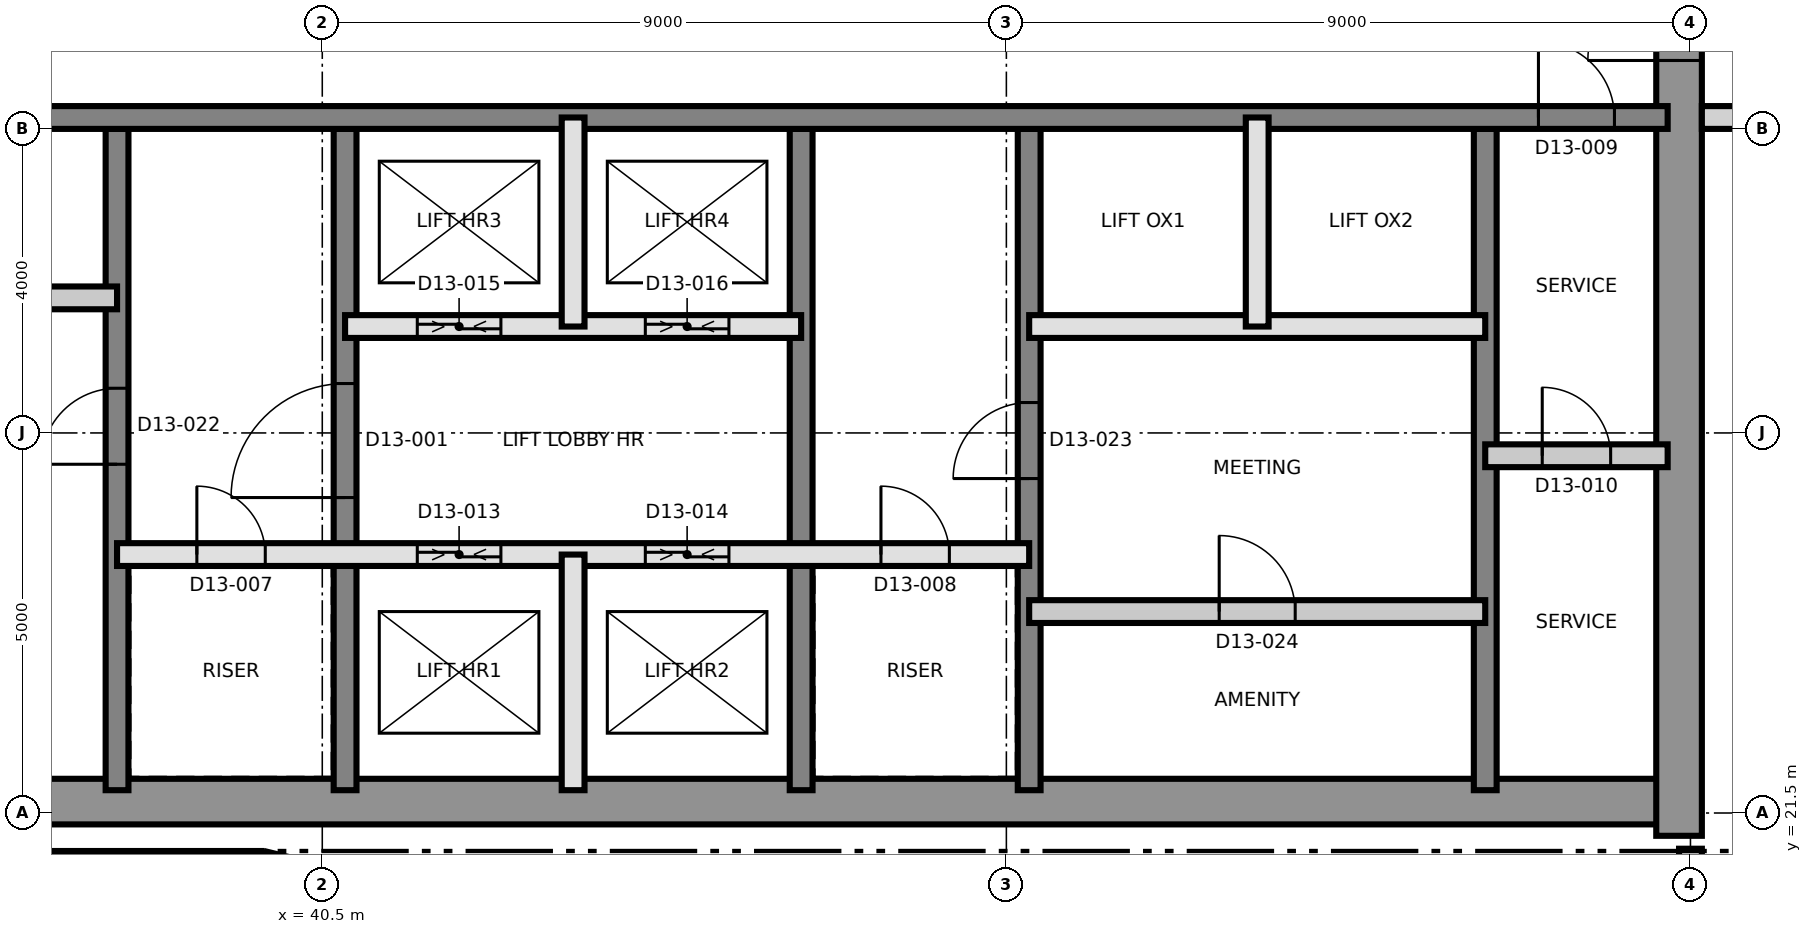
"""IFC4 building model, lengths in metres.
Left out: names, types, materials, properties, quantities, classifications, styles, units other than length and angle.
Written with IfcOpenShell. Run it as: python <this file> out.ifc"""

import sys

from ifc_helpers import new_model, si_unit, direction, frame, frame_2d, origin, place, context, subcontext, project, spatial, rectangle, extrude, element, fill, save


model = new_model("IFC4")
c1 = context("Model", 3, precision=1e-05, world=origin(), true_north=direction((0.0, 1.0)))
c2 = subcontext(c1, "Body", "Model", "MODEL_VIEW")
j1 = project(units=[si_unit("LENGTHUNIT", "METRE"), si_unit("PLANEANGLEUNIT", "RADIAN")], contexts=[c1])
p1 = place(None, origin())
s1 = spatial("IfcSite", under=j1, at=p1, CompositionType="ELEMENT")
p2 = place(p1, origin())
s2 = spatial("IfcBuilding", under=s1, at=p2, CompositionType="ELEMENT")
p3 = place(p2, frame((0.0, 0.0, 142.2)))
s3 = spatial("IfcBuildingStorey", under=s2, at=p3, CompositionType="ELEMENT", Elevation=142.2)
p4 = place(p3, frame((31.2, 21.65, 0.0), z_axis=(0.0, 0.0, 1.0), x_axis=(1.0, 0.0, 0.0)))
e1 = element("IfcWall", 1, at=p4, inside=s3, PredefinedType="SHEAR", context=c2, shape_type="SweptSolid", body=[
    extrude(rectangle(XDim=27.0, YDim=0.6, at=frame_2d((13.5, 0.0))), origin(), (0.0, 0.0, 1.0), 3.7),
])
p5 = place(p3, frame((58.35, 21.2, 0.0), z_axis=(0.0, 0.0, 1.0), x_axis=(0.0, 1.0, 0.0)))
e2 = element("IfcWall", 2, at=p5, inside=s3, PredefinedType="SHEAR", context=c2, shape_type="SweptSolid", body=[
    extrude(rectangle(XDim=18.6, YDim=0.6, at=frame_2d((9.3, 0.0))), origin(), (0.0, 0.0, 1.0), 3.7),
])
p6 = place(p5, frame((10.2, 0.0, 0.0)))
e3 = element("IfcOpeningElement", 3, at=p6, cuts=e2, PredefinedType="OPENING", context=c2, shape_type="SweptSolid", body=[
    extrude(rectangle(XDim=1.2, YDim=2.1, at=frame_2d((0.6, 1.05))), frame((0.0, 0.31, 0.0), z_axis=(0.0, -1.0, 0.0), x_axis=(1.0, 0.0, 0.0)), (0.0, 0.0, 1.0), 0.62),
])
p7 = place(p3, frame((37.8, 21.8, 0.0), z_axis=(0.0, 0.0, 1.0), x_axis=(0.0, 1.0, 0.0)))
e4 = element("IfcWall", 4, at=p7, inside=s3, PredefinedType="SHEAR", context=c2, shape_type="SweptSolid", body=[
    extrude(rectangle(XDim=8.7, YDim=0.3, at=frame_2d((4.35, 0.0))), origin(), (0.0, 0.0, 1.0), 3.7),
])
p8 = place(p7, frame((4.288, 0.0, 0.0)))
e5 = element("IfcOpeningElement", 5, at=p8, cuts=e4, PredefinedType="OPENING", context=c2, shape_type="SweptSolid", body=[
    extrude(rectangle(XDim=1.0, YDim=2.1, at=frame_2d((0.5, 1.05))), frame((0.0, 0.16, 0.0), z_axis=(0.0, -1.0, 0.0), x_axis=(1.0, 0.0, 0.0)), (0.0, 0.0, 1.0), 0.32),
])
p9 = place(p3, frame((40.8, 21.8, 0.0), z_axis=(0.0, 0.0, 1.0), x_axis=(0.0, 1.0, 0.0)))
e6 = element("IfcWall", 6, at=p9, inside=s3, PredefinedType="SHEAR", context=c2, shape_type="SweptSolid", body=[
    extrude(rectangle(XDim=8.7, YDim=0.3, at=frame_2d((4.35, 0.0))), origin(), (0.0, 0.0, 1.0), 3.7),
])
p10 = place(p9, frame((3.85, 0.0, 0.0)))
e7 = element("IfcOpeningElement", 7, at=p10, cuts=e6, PredefinedType="OPENING", context=c2, shape_type="SweptSolid", body=[
    extrude(rectangle(XDim=1.5, YDim=2.1, at=frame_2d((0.75, 1.05))), frame((0.0, 0.16, 0.0), z_axis=(0.0, -1.0, 0.0), x_axis=(1.0, 0.0, 0.0)), (0.0, 0.0, 1.0), 0.32),
])
p11 = place(p3, frame((46.8, 21.8, 0.0), z_axis=(0.0, 0.0, 1.0), x_axis=(0.0, 1.0, 0.0)))
e8 = element("IfcWall", 8, at=p11, inside=s3, PredefinedType="SHEAR", context=c2, shape_type="SweptSolid", body=[
    extrude(rectangle(XDim=8.7, YDim=0.3, at=frame_2d((4.35, 0.0))), origin(), (0.0, 0.0, 1.0), 3.7),
])
p12 = place(p3, frame((49.8, 21.8, 0.0), z_axis=(0.0, 0.0, 1.0), x_axis=(0.0, 1.0, 0.0)))
e9 = element("IfcWall", 9, at=p12, inside=s3, PredefinedType="SHEAR", context=c2, shape_type="SweptSolid", body=[
    extrude(rectangle(XDim=8.7, YDim=0.3, at=frame_2d((4.35, 0.0))), origin(), (0.0, 0.0, 1.0), 3.7),
])
p13 = place(p12, frame((4.1, 0.0, 0.0)))
e10 = element("IfcOpeningElement", 10, at=p13, cuts=e9, PredefinedType="OPENING", context=c2, shape_type="SweptSolid", body=[
    extrude(rectangle(XDim=1.0, YDim=2.1, at=frame_2d((0.5, 1.05))), frame((0.0, 0.16, 0.0), z_axis=(0.0, -1.0, 0.0), x_axis=(1.0, 0.0, 0.0)), (0.0, 0.0, 1.0), 0.32),
])
p14 = place(p3, frame((55.8, 21.8, 0.0), z_axis=(0.0, 0.0, 1.0), x_axis=(0.0, 1.0, 0.0)))
e11 = element("IfcWall", 11, at=p14, inside=s3, PredefinedType="SHEAR", context=c2, shape_type="SweptSolid", body=[
    extrude(rectangle(XDim=8.7, YDim=0.3, at=frame_2d((4.35, 0.0))), origin(), (0.0, 0.0, 1.0), 3.7),
])
p15 = place(p3, frame((31.8, 30.65, 0.0), z_axis=(0.0, 0.0, 1.0), x_axis=(1.0, 0.0, 0.0)))
e12 = element("IfcWall", 12, at=p15, inside=s3, PredefinedType="SHEAR", context=c2, shape_type="SweptSolid", body=[
    extrude(rectangle(XDim=26.4, YDim=0.3, at=frame_2d((13.2, 0.0))), origin(), (0.0, 0.0, 1.0), 3.7),
])
p16 = place(p15, frame((24.7, 0.0, 0.0)))
e13 = element("IfcOpeningElement", 13, at=p16, cuts=e12, PredefinedType="OPENING", context=c2, shape_type="SweptSolid", body=[
    extrude(rectangle(XDim=1.0, YDim=2.1, at=frame_2d((0.5, 1.05))), frame((0.0, 0.16, 0.0), z_axis=(0.0, -1.0, 0.0), x_axis=(1.0, 0.0, 0.0)), (0.0, 0.0, 1.0), 0.32),
])
p17 = place(p15, frame((4.0, 0.0, 0.0)))
e14 = element("IfcOpeningElement", 14, at=p17, cuts=e12, PredefinedType="OPENING", context=c2, shape_type="SweptSolid", body=[
    extrude(rectangle(XDim=1.0, YDim=2.1, at=frame_2d((0.5, 1.05))), frame((0.0, 0.16, 0.0), z_axis=(0.0, -1.0, 0.0), x_axis=(1.0, 0.0, 0.0)), (0.0, 0.0, 1.0), 0.32),
])
p18 = place(p3, frame((31.36, 20.85, 0.0), z_axis=(0.0, 0.0, 1.0), x_axis=(1.0, 0.0, 0.0)))
e15 = element("IfcWall", 15, at=p18, inside=s3, PredefinedType="SOLIDWALL", context=c2, shape_type="SweptSolid", body=[
    extrude(rectangle(XDim=8.34, YDim=0.3, at=frame_2d((4.17, 0.0))), origin(), (0.0, 0.0, 1.0), 3.4),
])
p19 = place(p3, frame((39.735, 20.846, 0.0), z_axis=(0.0, 0.0, 1.0), x_axis=(0.97206095595, -0.234728562212, 0.0)))
e16 = element("IfcWall", 16, at=p19, inside=s3, PredefinedType="SOLIDWALL", context=c2, shape_type="SweptSolid", body=[
    extrude(rectangle(XDim=2.35, YDim=0.3, at=frame_2d((1.175, 0.0))), origin(), (0.0, 0.0, 1.0), 3.4),
])
p20 = place(p3, frame((49.8, 24.15, 0.0), z_axis=(0.0, 0.0, 1.0), x_axis=(1.0, 0.0, 0.0)))
e17 = element("IfcWall", 17, at=p20, inside=s3, PredefinedType="PARTITIONING", context=c2, shape_type="SweptSolid", body=[
    extrude(rectangle(XDim=6.0, YDim=0.3, at=frame_2d((3.0, 0.0))), origin(), (0.0, 0.0, 1.0), 3.4),
])
p21 = place(p20, frame((2.5, 0.0, 0.0)))
e18 = element("IfcOpeningElement", 18, at=p21, cuts=e17, PredefinedType="OPENING", context=c2, shape_type="SweptSolid", body=[
    extrude(rectangle(XDim=1.0, YDim=2.1, at=frame_2d((0.5, 1.05))), frame((0.0, 0.16, 0.0), z_axis=(0.0, -1.0, 0.0), x_axis=(1.0, 0.0, 0.0)), (0.0, 0.0, 1.0), 0.32),
])
p22 = place(p3, frame((37.8, 24.9, 0.0), z_axis=(0.0, 0.0, 1.0), x_axis=(1.0, 0.0, 0.0)))
e19 = element("IfcWall", 19, at=p22, inside=s3, PredefinedType="SOLIDWALL", context=c2, shape_type="SweptSolid", body=[
    extrude(rectangle(XDim=12.0, YDim=0.3, at=frame_2d((6.0, 0.0))), origin(), (0.0, 0.0, 1.0), 3.4),
])
p23 = place(p22, frame((1.05, 0.0, 0.0)))
e20 = element("IfcOpeningElement", 20, at=p23, cuts=e19, PredefinedType="OPENING", context=c2, shape_type="SweptSolid", body=[
    extrude(rectangle(XDim=0.9, YDim=2.1, at=frame_2d((0.45, 1.05))), frame((0.0, 0.16, 0.0), z_axis=(0.0, -1.0, 0.0), x_axis=(1.0, 0.0, 0.0)), (0.0, 0.0, 1.0), 0.32),
])
p24 = place(p22, frame((10.05, 0.0, 0.0)))
e21 = element("IfcOpeningElement", 21, at=p24, cuts=e19, PredefinedType="OPENING", context=c2, shape_type="SweptSolid", body=[
    extrude(rectangle(XDim=0.9, YDim=2.1, at=frame_2d((0.45, 1.05))), frame((0.0, 0.16, 0.0), z_axis=(0.0, -1.0, 0.0), x_axis=(1.0, 0.0, 0.0)), (0.0, 0.0, 1.0), 0.32),
])
p25 = place(p22, frame((3.95, 0.0, 0.0)))
e22 = element("IfcOpeningElement", 22, at=p25, cuts=e19, PredefinedType="OPENING", context=c2, shape_type="SweptSolid", body=[
    extrude(rectangle(XDim=1.1, YDim=2.4, at=frame_2d((0.55, 1.2))), frame((0.0, 0.16, 0.0), z_axis=(0.0, -1.0, 0.0), x_axis=(1.0, 0.0, 0.0)), (0.0, 0.0, 1.0), 0.32),
])
p26 = place(p22, frame((6.95, 0.0, 0.0)))
e23 = element("IfcOpeningElement", 23, at=p26, cuts=e19, PredefinedType="OPENING", context=c2, shape_type="SweptSolid", body=[
    extrude(rectangle(XDim=1.1, YDim=2.4, at=frame_2d((0.55, 1.2))), frame((0.0, 0.16, 0.0), z_axis=(0.0, -1.0, 0.0), x_axis=(1.0, 0.0, 0.0)), (0.0, 0.0, 1.0), 0.32),
])
p27 = place(p3, frame((55.8, 26.2, 0.0), z_axis=(0.0, 0.0, 1.0), x_axis=(1.0, 0.0, 0.0)))
e24 = element("IfcWall", 24, at=p27, inside=s3, PredefinedType="PARTITIONING", context=c2, shape_type="SweptSolid", body=[
    extrude(rectangle(XDim=2.4, YDim=0.3, at=frame_2d((1.2, 0.0))), origin(), (0.0, 0.0, 1.0), 3.4),
])
p28 = place(p27, frame((0.75, 0.0, 0.0)))
e25 = element("IfcOpeningElement", 25, at=p28, cuts=e24, PredefinedType="OPENING", context=c2, shape_type="SweptSolid", body=[
    extrude(rectangle(XDim=0.9, YDim=2.1, at=frame_2d((0.45, 1.05))), frame((0.0, 0.16, 0.0), z_axis=(0.0, -1.0, 0.0), x_axis=(1.0, 0.0, 0.0)), (0.0, 0.0, 1.0), 0.32),
])
p29 = place(p3, frame((40.8, 27.9, 0.0), z_axis=(0.0, 0.0, 1.0), x_axis=(1.0, 0.0, 0.0)))
e26 = element("IfcWall", 26, at=p29, inside=s3, PredefinedType="SOLIDWALL", context=c2, shape_type="SweptSolid", body=[
    extrude(rectangle(XDim=6.0, YDim=0.3, at=frame_2d((3.0, 0.0))), origin(), (0.0, 0.0, 1.0), 3.4),
])
p30 = place(p29, frame((0.95, 0.0, 0.0)))
e27 = element("IfcOpeningElement", 27, at=p30, cuts=e26, PredefinedType="OPENING", context=c2, shape_type="SweptSolid", body=[
    extrude(rectangle(XDim=1.1, YDim=2.4, at=frame_2d((0.55, 1.2))), frame((0.0, 0.16, 0.0), z_axis=(0.0, -1.0, 0.0), x_axis=(1.0, 0.0, 0.0)), (0.0, 0.0, 1.0), 0.32),
])
p31 = place(p29, frame((3.95, 0.0, 0.0)))
e28 = element("IfcOpeningElement", 28, at=p31, cuts=e26, PredefinedType="OPENING", context=c2, shape_type="SweptSolid", body=[
    extrude(rectangle(XDim=1.1, YDim=2.4, at=frame_2d((0.55, 1.2))), frame((0.0, 0.16, 0.0), z_axis=(0.0, -1.0, 0.0), x_axis=(1.0, 0.0, 0.0)), (0.0, 0.0, 1.0), 0.32),
])
p32 = place(p3, frame((49.8, 27.9, 0.0), z_axis=(0.0, 0.0, 1.0), x_axis=(1.0, 0.0, 0.0)))
e29 = element("IfcWall", 29, at=p32, inside=s3, PredefinedType="SOLIDWALL", context=c2, shape_type="SweptSolid", body=[
    extrude(rectangle(XDim=6.0, YDim=0.3, at=frame_2d((3.0, 0.0))), origin(), (0.0, 0.0, 1.0), 3.4),
])
p33 = place(p3, frame((31.8, 28.277, 0.0), z_axis=(0.0, 0.0, 1.0), x_axis=(1.0, 0.0, 0.0)))
e30 = element("IfcWall", 30, at=p33, inside=s3, PredefinedType="PARTITIONING", context=c2, shape_type="SweptSolid", body=[
    extrude(rectangle(XDim=6.0, YDim=0.3, at=frame_2d((3.0, 0.0))), origin(), (0.0, 0.0, 1.0), 3.4),
])
p34 = place(p3, frame((43.8, 21.8, 0.0), z_axis=(0.0, 0.0, 1.0), x_axis=(0.0, 1.0, 0.0)))
e31 = element("IfcWall", 31, at=p34, inside=s3, PredefinedType="SOLIDWALL", context=c2, shape_type="SweptSolid", body=[
    extrude(rectangle(XDim=3.1, YDim=0.3, at=frame_2d((1.55, 0.0))), origin(), (0.0, 0.0, 1.0), 3.4),
])
for number, where, z_axis, x_axis in (
    (32, (43.8, 27.9, 0.0), (0.0, 0.0, 1.0), (0.0, 1.0, 0.0)),
    (33, (52.8, 27.9, 0.0), (0.0, 0.0, 1.0), (0.0, 1.0, 0.0)),
):
    element("IfcWall", number, at=place(p3, frame(where, z_axis=z_axis, x_axis=x_axis)), inside=s3, PredefinedType="SOLIDWALL", context=c2, shape_type="SweptSolid", body=[
        extrude(rectangle(XDim=2.75, YDim=0.3, at=frame_2d((1.375, 0.0))), origin(), (0.0, 0.0, 1.0), 3.4),
    ])
p35 = place(p3, frame((58.65, 30.65, 0.0), z_axis=(0.0, 0.0, 1.0), x_axis=(1.0, 0.0, 0.0)))
e34 = element("IfcWall", 34, at=p35, inside=s3, PredefinedType="PARTITIONING", context=c2, shape_type="SweptSolid", body=[
    extrude(rectangle(XDim=26.68, YDim=0.3, at=frame_2d((13.34, 0.0))), origin(), (0.0, 0.0, 1.0), 3.4),
])
p36 = place(p35, frame((2.2, 0.0, 0.0)))
e35 = element("IfcOpeningElement", 35, at=p36, cuts=e34, PredefinedType="OPENING", context=c2, shape_type="SweptSolid", body=[
    extrude(rectangle(XDim=1.0, YDim=2.4, at=frame_2d((0.5, 1.2))), frame((0.0, 0.16, 0.0), z_axis=(0.0, -1.0, 0.0), x_axis=(1.0, 0.0, 0.0)), (0.0, 0.0, 1.0), 0.32),
])
p37 = place(p35, frame((12.85, 0.0, 0.0)))
e36 = element("IfcOpeningElement", 36, at=p37, cuts=e34, PredefinedType="OPENING", context=c2, shape_type="SweptSolid", body=[
    extrude(rectangle(XDim=1.0, YDim=2.4, at=frame_2d((0.5, 1.2))), frame((0.0, 0.16, 0.0), z_axis=(0.0, -1.0, 0.0), x_axis=(1.0, 0.0, 0.0)), (0.0, 0.0, 1.0), 0.32),
])
p38 = place(p35, frame((20.77, 0.0, 0.0)))
e37 = element("IfcOpeningElement", 37, at=p38, cuts=e34, PredefinedType="OPENING", context=c2, shape_type="SweptSolid", body=[
    extrude(rectangle(XDim=1.0, YDim=2.1, at=frame_2d((0.5, 1.05))), frame((0.0, 0.16, 0.0), z_axis=(0.0, -1.0, 0.0), x_axis=(1.0, 0.0, 0.0)), (0.0, 0.0, 1.0), 0.32),
])
p39 = place(p35, frame((22.57, 0.0, 0.0)))
e38 = element("IfcOpeningElement", 38, at=p39, cuts=e34, PredefinedType="OPENING", context=c2, shape_type="SweptSolid", body=[
    extrude(rectangle(XDim=1.0, YDim=2.1, at=frame_2d((0.5, 1.05))), frame((0.0, 0.16, 0.0), z_axis=(0.0, -1.0, 0.0), x_axis=(1.0, 0.0, 0.0)), (0.0, 0.0, 1.0), 0.32),
])
p40 = place(p3, frame((58.5, 20.35, 0.0), z_axis=(0.0, 0.0, 1.0), x_axis=(0.0, 1.0, 0.0)))
e39 = element("IfcWall", 39, at=p40, inside=s3, PredefinedType="PARTITIONING", context=c2, shape_type="SweptSolid", body=[
    extrude(rectangle(XDim=0.68, YDim=0.3, at=frame_2d((0.34, 0.0))), origin(), (0.0, 0.0, 1.0), 3.4),
])
p41 = place(p10, origin())
e40 = element("IfcDoor", 40, at=p41, inside=s3, OperationType="SINGLE_SWING_RIGHT", PredefinedType="DOOR", context=c2, shape_type="SweptSolid", body=[
    extrude(rectangle(XDim=1.5, YDim=2.1, at=frame_2d((0.75, 1.05))), frame((0.0, 0.025, 0.0), z_axis=(0.0, -1.0, 0.0), x_axis=(1.0, 0.0, 0.0)), (0.0, 0.0, 1.0), 0.05),
])
fill(e7, e40)
p42 = place(p23, origin())
e41 = element("IfcDoor", 41, at=p42, inside=s3, OperationType="SINGLE_SWING_LEFT", PredefinedType="DOOR", context=c2, shape_type="SweptSolid", body=[
    extrude(rectangle(XDim=0.9, YDim=2.1, at=frame_2d((0.45, 1.05))), frame((0.0, 0.025, 0.0), z_axis=(0.0, -1.0, 0.0), x_axis=(1.0, 0.0, 0.0)), (0.0, 0.0, 1.0), 0.05),
])
fill(e20, e41)
p43 = place(p24, origin())
e42 = element("IfcDoor", 42, at=p43, inside=s3, OperationType="SINGLE_SWING_RIGHT", PredefinedType="DOOR", context=c2, shape_type="SweptSolid", body=[
    extrude(rectangle(XDim=0.9, YDim=2.1, at=frame_2d((0.45, 1.05))), frame((0.0, 0.025, 0.0), z_axis=(0.0, -1.0, 0.0), x_axis=(1.0, 0.0, 0.0)), (0.0, 0.0, 1.0), 0.05),
])
fill(e21, e42)
p44 = place(p16, origin())
e43 = element("IfcDoor", 43, at=p44, inside=s3, OperationType="SINGLE_SWING_LEFT", PredefinedType="DOOR", context=c2, shape_type="SweptSolid", body=[
    extrude(rectangle(XDim=1.0, YDim=2.1, at=frame_2d((0.5, 1.05))), frame((0.0, 0.025, 0.0), z_axis=(0.0, -1.0, 0.0), x_axis=(1.0, 0.0, 0.0)), (0.0, 0.0, 1.0), 0.05),
])
fill(e13, e43)
p45 = place(p28, origin())
e44 = element("IfcDoor", 44, at=p45, inside=s3, OperationType="SINGLE_SWING_RIGHT", PredefinedType="DOOR", context=c2, shape_type="SweptSolid", body=[
    extrude(rectangle(XDim=0.9, YDim=2.1, at=frame_2d((0.45, 1.05))), frame((0.0, 0.025, 0.0), z_axis=(0.0, -1.0, 0.0), x_axis=(1.0, 0.0, 0.0)), (0.0, 0.0, 1.0), 0.05),
])
fill(e25, e44)
p46 = place(p6, origin())
e45 = element("IfcDoor", 45, at=p46, inside=s3, OperationType="SINGLE_SWING_LEFT", PredefinedType="DOOR", context=c2, shape_type="SweptSolid", body=[
    extrude(rectangle(XDim=1.2, YDim=2.1, at=frame_2d((0.6, 1.05))), frame((0.0, 0.025, 0.0), z_axis=(0.0, -1.0, 0.0), x_axis=(1.0, 0.0, 0.0)), (0.0, 0.0, 1.0), 0.05),
])
fill(e3, e45)
p47 = place(p25, origin())
e46 = element("IfcDoor", 46, at=p47, inside=s3, OperationType="SLIDING_TO_LEFT", PredefinedType="DOOR", context=c2, shape_type="SweptSolid", body=[
    extrude(rectangle(XDim=1.1, YDim=2.4, at=frame_2d((0.55, 1.2))), frame((0.0, 0.025, 0.0), z_axis=(0.0, -1.0, 0.0), x_axis=(1.0, 0.0, 0.0)), (0.0, 0.0, 1.0), 0.05),
])
fill(e22, e46)
p48 = place(p26, origin())
e47 = element("IfcDoor", 47, at=p48, inside=s3, OperationType="SLIDING_TO_LEFT", PredefinedType="DOOR", context=c2, shape_type="SweptSolid", body=[
    extrude(rectangle(XDim=1.1, YDim=2.4, at=frame_2d((0.55, 1.2))), frame((0.0, 0.025, 0.0), z_axis=(0.0, -1.0, 0.0), x_axis=(1.0, 0.0, 0.0)), (0.0, 0.0, 1.0), 0.05),
])
fill(e23, e47)
p49 = place(p30, origin())
e48 = element("IfcDoor", 48, at=p49, inside=s3, OperationType="SLIDING_TO_LEFT", PredefinedType="DOOR", context=c2, shape_type="SweptSolid", body=[
    extrude(rectangle(XDim=1.1, YDim=2.4, at=frame_2d((0.55, 1.2))), frame((0.0, 0.025, 0.0), z_axis=(0.0, -1.0, 0.0), x_axis=(1.0, 0.0, 0.0)), (0.0, 0.0, 1.0), 0.05),
])
fill(e27, e48)
p50 = place(p31, origin())
e49 = element("IfcDoor", 49, at=p50, inside=s3, OperationType="SLIDING_TO_LEFT", PredefinedType="DOOR", context=c2, shape_type="SweptSolid", body=[
    extrude(rectangle(XDim=1.1, YDim=2.4, at=frame_2d((0.55, 1.2))), frame((0.0, 0.025, 0.0), z_axis=(0.0, -1.0, 0.0), x_axis=(1.0, 0.0, 0.0)), (0.0, 0.0, 1.0), 0.05),
])
fill(e28, e49)
p51 = place(p8, origin())
e50 = element("IfcDoor", 50, at=p51, inside=s3, OperationType="SINGLE_SWING_RIGHT", PredefinedType="DOOR", context=c2, shape_type="SweptSolid", body=[
    extrude(rectangle(XDim=1.0, YDim=2.1, at=frame_2d((0.5, 1.05))), frame((0.0, 0.025, 0.0), z_axis=(0.0, -1.0, 0.0), x_axis=(1.0, 0.0, 0.0)), (0.0, 0.0, 1.0), 0.05),
])
fill(e5, e50)
p52 = place(p13, origin())
e51 = element("IfcDoor", 51, at=p52, inside=s3, OperationType="SINGLE_SWING_LEFT", PredefinedType="DOOR", context=c2, shape_type="SweptSolid", body=[
    extrude(rectangle(XDim=1.0, YDim=2.1, at=frame_2d((0.5, 1.05))), frame((0.0, 0.025, 0.0), z_axis=(0.0, -1.0, 0.0), x_axis=(1.0, 0.0, 0.0)), (0.0, 0.0, 1.0), 0.05),
])
fill(e10, e51)
p53 = place(p21, origin())
e52 = element("IfcDoor", 52, at=p53, inside=s3, OperationType="SINGLE_SWING_RIGHT", PredefinedType="DOOR", context=c2, shape_type="SweptSolid", body=[
    extrude(rectangle(XDim=1.0, YDim=2.1, at=frame_2d((0.5, 1.05))), frame((0.0, 0.025, 0.0), z_axis=(0.0, -1.0, 0.0), x_axis=(1.0, 0.0, 0.0)), (0.0, 0.0, 1.0), 0.05),
])
fill(e18, e52)
save(model, sys.argv[1])
